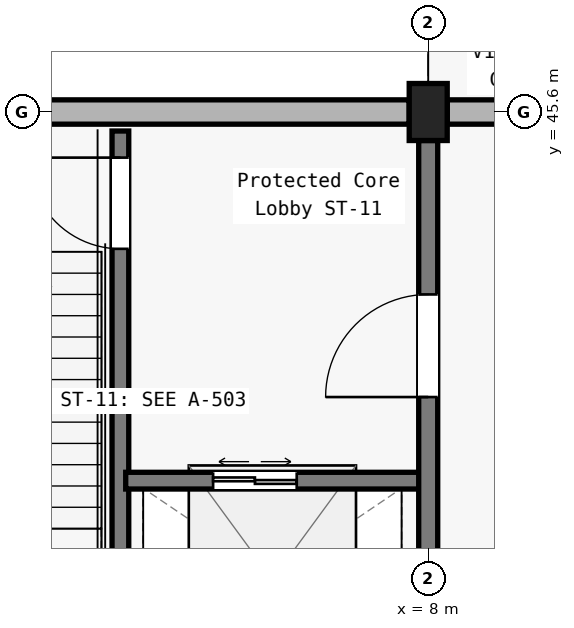
"""IFC4 building model, lengths in metres.
Left out: names, types, materials, properties, quantities, classifications, styles, units other than length and angle.
Written with IfcOpenShell. Run it as: python <this file> out.ifc"""

import sys

from ifc_helpers import new_model, si_unit, direction, frame, frame_2d, origin, origin_2d, place, context, subcontext, project, spatial, rectangle, extrude, element, fill, save


model = new_model("IFC4")
c1 = context("Model", 3, precision=1e-05, world=origin(), true_north=direction((0.0, 1.0)))
c2 = subcontext(c1, "Body", "Model", "MODEL_VIEW")
j1 = project(units=[si_unit("LENGTHUNIT", "METRE"), si_unit("PLANEANGLEUNIT", "RADIAN")], contexts=[c1])
p1 = place(None, origin())
s1 = spatial("IfcSite", under=j1, at=p1, CompositionType="ELEMENT")
p2 = place(p1, origin())
s2 = spatial("IfcBuilding", under=s1, at=p2, CompositionType="ELEMENT")
p3 = place(p2, frame((0.0, 0.0, 15.0)))
s3 = spatial("IfcBuildingStorey", under=s2, at=p3, CompositionType="ELEMENT", Elevation=15.0)
p4 = place(p3, frame((8.0, 45.6, 0.0), z_axis=(0.0, 0.0, 1.0), x_axis=(1.0, 0.0, 0.0)))
e1 = element("IfcColumn", 1, at=p4, inside=s3, PredefinedType="COLUMN", context=c2, shape_type="SweptSolid", body=[
    extrude(rectangle(XDim=0.5, YDim=0.75, at=origin_2d()), origin(), (0.0, 0.0, 1.0), 4.8),
])
for number, where, z_axis, x_axis in (
    (2, (0.3, 45.6, 0.0), (0.0, 0.0, 1.0), (1.0, 0.0, 0.0)),
    (3, (8.25, 45.6, 0.0), (0.0, 0.0, 1.0), (1.0, 0.0, 0.0)),
):
    element("IfcWall", number, at=place(p3, frame(where, z_axis=z_axis, x_axis=x_axis)), inside=s3, PredefinedType="SOLIDWALL", context=c2, shape_type="SweptSolid", body=[
        extrude(rectangle(XDim=7.45, YDim=0.32, at=frame_2d((3.725, 0.0))), origin(), (0.0, 0.0, 1.0), 3.87),
    ])
p5 = place(p3, frame((3.95, 38.25, 0.0), z_axis=(0.0, 0.0, 1.0), x_axis=(0.0, 1.0, 0.0)))
e4 = element("IfcWall", 4, at=p5, inside=s3, PredefinedType="SOLIDWALL", context=c2, shape_type="SweptSolid", body=[
    extrude(rectangle(XDim=7.1, YDim=0.22, at=frame_2d((3.55, 0.0))), origin(), (0.0, 0.0, 1.0), 4.53),
])
p6 = place(p5, frame((5.55, 0.0, 0.0)))
e5 = element("IfcOpeningElement", 5, at=p6, cuts=e4, PredefinedType="OPENING", context=c2, shape_type="SweptSolid", body=[
    extrude(rectangle(XDim=1.2, YDim=2.15, at=frame_2d((0.6, 1.075))), frame((0.0, 0.12, 0.0), z_axis=(0.0, -1.0, 0.0), x_axis=(1.0, 0.0, 0.0)), (0.0, 0.0, 1.0), 0.24),
])
p7 = place(p3, frame((4.02, 40.75, 0.0), z_axis=(0.0, 0.0, 1.0), x_axis=(1.0, 0.0, 0.0)))
e6 = element("IfcWall", 6, at=p7, inside=s3, PredefinedType="SOLIDWALL", context=c2, shape_type="SweptSolid", body=[
    extrude(rectangle(XDim=3.93, YDim=0.22, at=frame_2d((1.965, 0.0))), origin(), (0.0, 0.0, 1.0), 3.88),
])
p8 = place(p7, frame((1.15, 0.0, 0.0)))
e7 = element("IfcOpeningElement", 7, at=p8, cuts=e6, PredefinedType="OPENING", context=c2, shape_type="SweptSolid", body=[
    extrude(rectangle(XDim=1.1, YDim=2.2, at=frame_2d((0.55, 1.1))), frame((0.0, 0.12, 0.0), z_axis=(0.0, -1.0, 0.0), x_axis=(1.0, 0.0, 0.0)), (0.0, 0.0, 1.0), 0.24),
])
p9 = place(p3, frame((8.0, 38.45, 0.0), z_axis=(0.0, 0.0, 1.0), x_axis=(0.0, 1.0, 0.0)))
e8 = element("IfcWall", 8, at=p9, inside=s3, PredefinedType="SOLIDWALL", context=c2, shape_type="SweptSolid", body=[
    extrude(rectangle(XDim=6.775, YDim=0.25, at=frame_2d((3.388, 0.0))), origin(), (0.0, 0.0, 1.0), 3.755),
])
p10 = place(p9, frame((3.4, 0.0, 0.0)))
e9 = element("IfcOpeningElement", 9, at=p10, cuts=e8, PredefinedType="OPENING", context=c2, shape_type="SweptSolid", body=[
    extrude(rectangle(XDim=1.35, YDim=2.2, at=frame_2d((0.675, 1.1))), frame((0.0, 0.135, 0.0), z_axis=(0.0, -1.0, 0.0), x_axis=(1.0, 0.0, 0.0)), (0.0, 0.0, 1.0), 0.27),
])
p11 = place(p6, origin())
e10 = element("IfcDoor", 10, at=p11, inside=s3, OperationType="SINGLE_SWING_RIGHT", PredefinedType="DOOR", context=c2, shape_type="SweptSolid", body=[
    extrude(rectangle(XDim=1.2, YDim=2.15, at=frame_2d((0.6, 1.075))), frame((0.0, 0.025, 0.0), z_axis=(0.0, -1.0, 0.0), x_axis=(1.0, 0.0, 0.0)), (0.0, 0.0, 1.0), 0.05),
])
fill(e5, e10)
p12 = place(p8, origin())
e11 = element("IfcDoor", 11, at=p12, inside=s3, OperationType="DOUBLE_DOOR_SLIDING", PredefinedType="DOOR", context=c2, shape_type="SweptSolid", body=[
    extrude(rectangle(XDim=1.1, YDim=2.2, at=frame_2d((0.55, 1.1))), frame((0.0, 0.025, 0.0), z_axis=(0.0, -1.0, 0.0), x_axis=(1.0, 0.0, 0.0)), (0.0, 0.0, 1.0), 0.05),
])
fill(e7, e11)
p13 = place(p10, origin())
e12 = element("IfcDoor", 12, at=p13, inside=s3, OperationType="SINGLE_SWING_LEFT", PredefinedType="DOOR", context=c2, shape_type="SweptSolid", body=[
    extrude(rectangle(XDim=1.35, YDim=2.2, at=frame_2d((0.675, 1.1))), frame((0.0, 0.025, 0.0), z_axis=(0.0, -1.0, 0.0), x_axis=(1.0, 0.0, 0.0)), (0.0, 0.0, 1.0), 0.05),
])
fill(e9, e12)
save(model, sys.argv[1])
